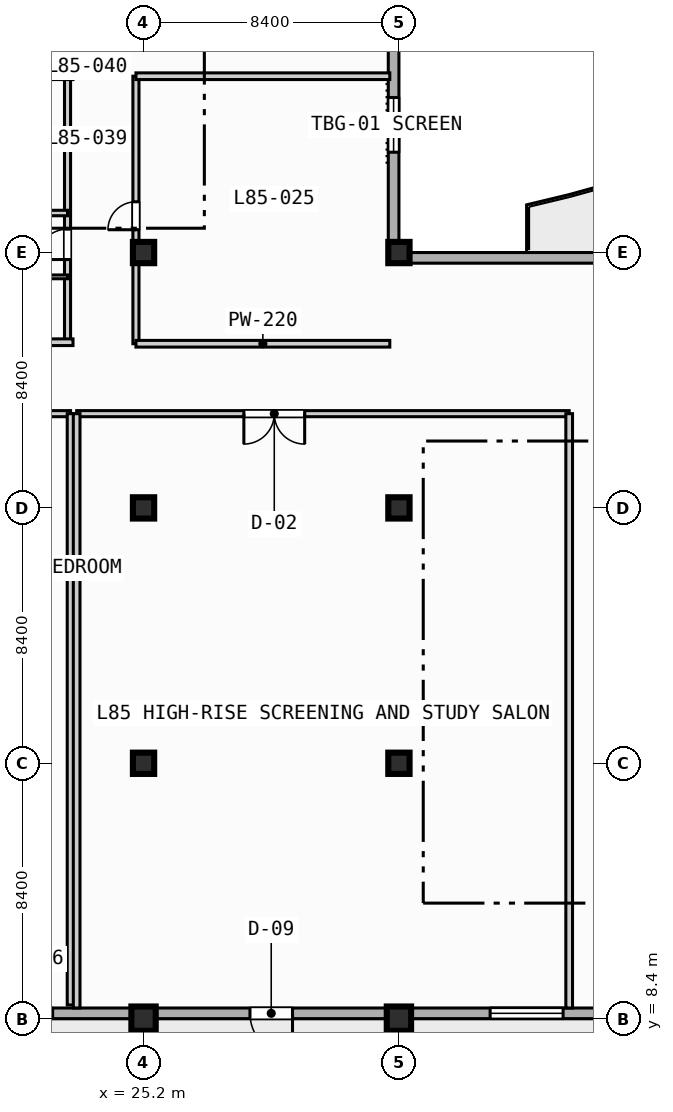
"""IFC4 building model, lengths in metres.
Left out: names, types, materials, properties, quantities, classifications, styles, units other than length and angle.
Written with IfcOpenShell. Run it as: python <this file> out.ifc"""

import sys

from ifc_helpers import new_model, si_unit, direction, frame, frame_2d, origin, origin_2d, place, context, subcontext, project, spatial, rectangle, extrude, element, fill, save


model = new_model("IFC4")
c1 = context("Model", 3, precision=1e-05, world=origin(), true_north=direction((0.0, 1.0)))
c2 = subcontext(c1, "Body", "Model", "MODEL_VIEW")
j1 = project(units=[si_unit("LENGTHUNIT", "METRE"), si_unit("PLANEANGLEUNIT", "RADIAN")], contexts=[c1])
p1 = place(None, origin())
s1 = spatial("IfcSite", under=j1, at=p1, CompositionType="ELEMENT")
p2 = place(p1, origin())
s2 = spatial("IfcBuilding", under=s1, at=p2, CompositionType="ELEMENT")
p3 = place(p2, frame((0.0, 0.0, 343.7)))
s3 = spatial("IfcBuildingStorey", under=s2, at=p3, CompositionType="ELEMENT", Elevation=343.7)
p4 = place(p3, frame((25.2, 8.4, 0.0), z_axis=(0.0, 0.0, 1.0), x_axis=(1.0, 0.0, 0.0)))
e1 = element("IfcColumn", 1, at=p4, inside=s3, PredefinedType="COLUMN", context=c2, shape_type="SweptSolid", body=[
    extrude(rectangle(XDim=0.8, YDim=0.8, at=origin_2d()), origin(), (0.0, 0.0, 1.0), 3.9),
])
for number, where, z_axis, x_axis in (
    (2, (25.2, 16.8, 0.0), (0.0, 0.0, 1.0), (1.0, 0.0, 0.0)),
    (3, (25.2, 25.2, 0.0), (0.0, 0.0, 1.0), (1.0, 0.0, 0.0)),
    (4, (25.2, 33.6, 0.0), (0.0, 0.0, 1.0), (1.0, 0.0, 0.0)),
):
    element("IfcColumn", number, at=place(p3, frame(where, z_axis=z_axis, x_axis=x_axis)), inside=s3, PredefinedType="COLUMN", context=c2, shape_type="SweptSolid", body=[
        extrude(rectangle(XDim=0.7, YDim=0.7, at=origin_2d()), origin(), (0.0, 0.0, 1.0), 3.9),
    ])
p5 = place(p3, frame((33.6, 8.4, 0.0), z_axis=(0.0, 0.0, 1.0), x_axis=(1.0, 0.0, 0.0)))
e5 = element("IfcColumn", 5, at=p5, inside=s3, PredefinedType="COLUMN", context=c2, shape_type="SweptSolid", body=[
    extrude(rectangle(XDim=0.8, YDim=0.8, at=origin_2d()), origin(), (0.0, 0.0, 1.0), 3.9),
])
for number, where, z_axis, x_axis in (
    (6, (33.6, 16.8, 0.0), (0.0, 0.0, 1.0), (1.0, 0.0, 0.0)),
    (7, (33.6, 25.2, 0.0), (0.0, 0.0, 1.0), (1.0, 0.0, 0.0)),
    (8, (33.6, 33.6, 0.0), (0.0, 0.0, 1.0), (1.0, 0.0, 0.0)),
):
    element("IfcColumn", number, at=place(p3, frame(where, z_axis=z_axis, x_axis=x_axis)), inside=s3, PredefinedType="COLUMN", context=c2, shape_type="SweptSolid", body=[
        extrude(rectangle(XDim=0.7, YDim=0.7, at=origin_2d()), origin(), (0.0, 0.0, 1.0), 3.9),
    ])
p6 = place(p3, frame((33.425, 72.425, 0.0), z_axis=(0.0, 0.0, 1.0), x_axis=(0.0, -1.0, 0.0)))
e9 = element("IfcWall", 9, at=p6, inside=s3, PredefinedType="STANDARD", context=c2, shape_type="SweptSolid", body=[
    extrude(rectangle(XDim=39.0, YDim=0.35, at=frame_2d((19.5, 0.0))), origin(), (0.0, 0.0, 1.0), 3.67),
])
p7 = place(p6, frame((33.725, 0.0, 0.85)))
e10 = element("IfcOpeningElement", 10, at=p7, cuts=e9, PredefinedType="OPENING", context=c2, shape_type="SweptSolid", body=[
    extrude(rectangle(XDim=1.8, YDim=1.8, at=frame_2d((0.9, 0.9))), frame((0.0, 0.185, 0.0), z_axis=(0.0, -1.0, 0.0), x_axis=(1.0, 0.0, 0.0)), (0.0, 0.0, 1.0), 0.37),
])
p8 = place(p6, frame((8.225, 0.0, 0.85)))
e11 = element("IfcOpeningElement", 11, at=p8, cuts=e9, PredefinedType="OPENING", context=c2, shape_type="SweptSolid", body=[
    extrude(rectangle(XDim=2.4, YDim=1.95, at=frame_2d((1.2, 0.975))), frame((0.0, 0.185, 0.0), z_axis=(0.0, -1.0, 0.0), x_axis=(1.0, 0.0, 0.0)), (0.0, 0.0, 1.0), 0.37),
])
p9 = place(p3, frame((33.425, 33.425, 0.0), z_axis=(0.0, 0.0, 1.0), x_axis=(1.0, 0.0, 0.0)))
e12 = element("IfcWall", 12, at=p9, inside=s3, PredefinedType="STANDARD", context=c2, shape_type="SweptSolid", body=[
    extrude(rectangle(XDim=30.6, YDim=0.35, at=frame_2d((15.3, 0.0))), origin(), (0.0, 0.0, 1.0), 3.67),
])
p10 = place(p9, frame((12.075, 0.0, 0.0)))
e13 = element("IfcOpeningElement", 13, at=p10, cuts=e12, PredefinedType="OPENING", context=c2, shape_type="SweptSolid", body=[
    extrude(rectangle(XDim=1.4, YDim=2.2, at=frame_2d((0.7, 1.1))), frame((0.0, 0.185, 0.0), z_axis=(0.0, -1.0, 0.0), x_axis=(1.0, 0.0, 0.0)), (0.0, 0.0, 1.0), 0.37),
])
p11 = place(p3, frame((64.025, 8.575, 0.0), z_axis=(0.0, 0.0, 1.0), x_axis=(-1.0, 0.0, 0.0)))
e14 = element("IfcWall", 14, at=p11, inside=s3, PredefinedType="STANDARD", context=c2, shape_type="SweptSolid", body=[
    extrude(rectangle(XDim=52.45, YDim=0.35, at=frame_2d((26.225, 0.0))), origin(), (0.0, 0.0, 1.0), 3.67),
])
p12 = place(p11, frame((33.925, 0.0, 0.0)))
e15 = element("IfcOpeningElement", 15, at=p12, cuts=e14, PredefinedType="OPENING", context=c2, shape_type="SweptSolid", body=[
    extrude(rectangle(XDim=1.4, YDim=2.2, at=frame_2d((0.7, 1.1))), frame((0.0, 0.185, 0.0), z_axis=(0.0, -1.0, 0.0), x_axis=(1.0, 0.0, 0.0)), (0.0, 0.0, 1.0), 0.37),
])
p13 = place(p11, frame((25.025, 0.0, 0.85)))
e16 = element("IfcOpeningElement", 16, at=p13, cuts=e14, PredefinedType="OPENING", context=c2, shape_type="SweptSolid", body=[
    extrude(rectangle(XDim=2.4, YDim=1.95, at=frame_2d((1.2, 0.975))), frame((0.0, 0.185, 0.0), z_axis=(0.0, -1.0, 0.0), x_axis=(1.0, 0.0, 0.0)), (0.0, 0.0, 1.0), 0.37),
])
p14 = place(p11, frame((16.925, 0.0, 0.85)))
e17 = element("IfcOpeningElement", 17, at=p14, cuts=e14, PredefinedType="OPENING", context=c2, shape_type="SweptSolid", body=[
    extrude(rectangle(XDim=1.8, YDim=1.8, at=frame_2d((0.9, 0.9))), frame((0.0, 0.185, 0.0), z_axis=(0.0, -1.0, 0.0), x_axis=(1.0, 0.0, 0.0)), (0.0, 0.0, 1.0), 0.37),
])
p15 = place(p11, frame((41.815, 0.0, 0.85)))
e18 = element("IfcOpeningElement", 18, at=p15, cuts=e14, PredefinedType="OPENING", context=c2, shape_type="SweptSolid", body=[
    extrude(rectangle(XDim=1.8, YDim=1.8, at=frame_2d((0.9, 0.9))), frame((0.0, 0.185, 0.0), z_axis=(0.0, -1.0, 0.0), x_axis=(1.0, 0.0, 0.0)), (0.0, 0.0, 1.0), 0.37),
])
p16 = place(p11, frame((49.535, 0.0, 0.85)))
e19 = element("IfcOpeningElement", 19, at=p16, cuts=e14, PredefinedType="OPENING", context=c2, shape_type="SweptSolid", body=[
    extrude(rectangle(XDim=1.8, YDim=1.8, at=frame_2d((0.9, 0.9))), frame((0.0, 0.185, 0.0), z_axis=(0.0, -1.0, 0.0), x_axis=(1.0, 0.0, 0.0)), (0.0, 0.0, 1.0), 0.37),
])
p17 = place(p3, frame((24.95, 30.6, 0.0), z_axis=(0.0, 0.0, 1.0), x_axis=(0.0, 1.0, 0.0)))
e20 = element("IfcWall", 20, at=p17, inside=s3, PredefinedType="PARTITIONING", context=c2, shape_type="SweptSolid", body=[
    extrude(rectangle(XDim=8.8, YDim=0.2, at=frame_2d((4.4, 0.0))), origin(), (0.0, 0.0, 1.0), 3.07),
])
p18 = place(p17, frame((3.75, 0.0, 0.0)))
e21 = element("IfcOpeningElement", 21, at=p18, cuts=e20, PredefinedType="OPENING", context=c2, shape_type="SweptSolid", body=[
    extrude(rectangle(XDim=0.92, YDim=2.1, at=frame_2d((0.46, 1.05))), frame((0.0, 0.11, 0.0), z_axis=(0.0, -1.0, 0.0), x_axis=(1.0, 0.0, 0.0)), (0.0, 0.0, 1.0), 0.22),
])
for number, where, z_axis, x_axis in (
    (22, (24.95, 30.6, 0.0), (0.0, 0.0, 1.0), (1.0, 0.0, 0.0)),
    (23, (24.95, 39.4, 0.0), (0.0, 0.0, 1.0), (1.0, 0.0, 0.0)),
):
    element("IfcWall", number, at=place(p3, frame(where, z_axis=z_axis, x_axis=x_axis)), inside=s3, PredefinedType="PARTITIONING", context=c2, shape_type="SweptSolid", body=[
        extrude(rectangle(XDim=8.35, YDim=0.22, at=frame_2d((4.175, 0.0))), origin(), (0.0, 0.0, 1.0), 3.67),
    ])
p19 = place(p3, frame((11.8, 28.3, 0.0), z_axis=(0.0, 0.0, 1.0), x_axis=(1.0, 0.0, 0.0)))
e24 = element("IfcWall", 24, at=p19, inside=s3, PredefinedType="PARTITIONING", context=c2, shape_type="SweptSolid", body=[
    extrude(rectangle(XDim=11.0, YDim=0.2, at=frame_2d((5.5, 0.0))), origin(), (0.0, 0.0, 1.0), 3.67),
])
p20 = place(p19, frame((4.05, 0.0, 0.0)))
e25 = element("IfcOpeningElement", 25, at=p20, cuts=e24, PredefinedType="OPENING", context=c2, shape_type="SweptSolid", body=[
    extrude(rectangle(XDim=1.0, YDim=2.15, at=frame_2d((0.5, 1.075))), frame((0.0, 0.11, 0.0), z_axis=(0.0, -1.0, 0.0), x_axis=(1.0, 0.0, 0.0)), (0.0, 0.0, 1.0), 0.22),
])
p21 = place(p3, frame((22.8, 8.85, 0.0), z_axis=(0.0, 0.0, 1.0), x_axis=(0.0, 1.0, 0.0)))
e26 = element("IfcWall", 26, at=p21, inside=s3, PredefinedType="PARTITIONING", context=c2, shape_type="SweptSolid", body=[
    extrude(rectangle(XDim=19.45, YDim=0.22, at=frame_2d((9.725, 0.0))), origin(), (0.0, 0.0, 1.0), 3.67),
])
p22 = place(p3, frame((23.0, 28.3, 0.0), z_axis=(0.0, 0.0, 1.0), x_axis=(1.0, 0.0, 0.0)))
e27 = element("IfcWall", 27, at=p22, inside=s3, PredefinedType="PARTITIONING", context=c2, shape_type="SweptSolid", body=[
    extrude(rectangle(XDim=16.2, YDim=0.2, at=frame_2d((8.1, 0.0))), origin(), (0.0, 0.0, 1.0), 3.67),
])
p23 = place(p22, frame((5.5, 0.0, 0.0)))
e28 = element("IfcOpeningElement", 28, at=p23, cuts=e27, PredefinedType="OPENING", context=c2, shape_type="SweptSolid", body=[
    extrude(rectangle(XDim=2.0, YDim=2.15, at=frame_2d((1.0, 1.075))), frame((0.0, 0.11, 0.0), z_axis=(0.0, -1.0, 0.0), x_axis=(1.0, 0.0, 0.0)), (0.0, 0.0, 1.0), 0.22),
])
for number, where, z_axis, x_axis in (
    (29, (23.0, 8.75, 0.0), (0.0, 0.0, 1.0), (0.0, 1.0, 0.0)),
    (30, (39.2, 8.75, 0.0), (0.0, 0.0, 1.0), (0.0, 1.0, 0.0)),
):
    element("IfcWall", number, at=place(p3, frame(where, z_axis=z_axis, x_axis=x_axis)), inside=s3, PredefinedType="PARTITIONING", context=c2, shape_type="SweptSolid", body=[
        extrude(rectangle(XDim=19.55, YDim=0.22, at=frame_2d((9.775, 0.0))), origin(), (0.0, 0.0, 1.0), 3.67),
    ])
p24 = place(p3, frame((22.7, 30.65, 0.0), z_axis=(0.0, 0.0, 1.0), x_axis=(0.0, 1.0, 0.0)))
e31 = element("IfcWall", 31, at=p24, inside=s3, PredefinedType="PARTITIONING", context=c2, shape_type="SweptSolid", body=[
    extrude(rectangle(XDim=8.75, YDim=0.2, at=frame_2d((4.375, 0.0))), origin(), (0.0, 0.0, 1.0), 3.67),
])
p25 = place(p24, frame((2.72, 0.0, 0.0)))
e32 = element("IfcOpeningElement", 32, at=p25, cuts=e31, PredefinedType="OPENING", context=c2, shape_type="SweptSolid", body=[
    extrude(rectangle(XDim=1.0, YDim=2.15, at=frame_2d((0.5, 1.075))), frame((0.0, 0.11, 0.0), z_axis=(0.0, -1.0, 0.0), x_axis=(1.0, 0.0, 0.0)), (0.0, 0.0, 1.0), 0.22),
])
for number, where, z_axis, x_axis in (
    (33, (8.6, 30.65, 0.0), (0.0, 0.0, 1.0), (1.0, 0.0, 0.0)),
    (34, (8.6, 39.4, 0.0), (0.0, 0.0, 1.0), (1.0, 0.0, 0.0)),
):
    element("IfcWall", number, at=place(p3, frame(where, z_axis=z_axis, x_axis=x_axis)), inside=s3, PredefinedType="PARTITIONING", context=c2, shape_type="SweptSolid", body=[
        extrude(rectangle(XDim=14.28, YDim=0.22, at=frame_2d((7.14, 0.0))), origin(), (0.0, 0.0, 1.0), 3.67),
    ])
for number, where, z_axis, x_axis in (
    (35, (20.25, 34.9, 0.0), (0.0, 0.0, 1.0), (1.0, 0.0, 0.0)),
    (36, (20.25, 37.06, 0.0), (0.0, 0.0, 1.0), (1.0, 0.0, 0.0)),
):
    element("IfcWall", number, at=place(p3, frame(where, z_axis=z_axis, x_axis=x_axis)), inside=s3, PredefinedType="PLUMBINGWALL", context=c2, shape_type="SweptSolid", body=[
        extrude(rectangle(XDim=2.45, YDim=0.18, at=frame_2d((1.225, 0.0))), origin(), (0.0, 0.0, 1.0), 3.67),
    ])
p26 = place(p3, frame((8.75, 32.8, 0.0), z_axis=(0.0, 0.0, 1.0), x_axis=(1.0, 0.0, 0.0)))
e37 = element("IfcWall", 37, at=p26, inside=s3, PredefinedType="PARTITIONING", context=c2, shape_type="SweptSolid", body=[
    extrude(rectangle(XDim=13.95, YDim=0.125, at=frame_2d((6.975, 0.0))), origin(), (0.0, 0.0, 1.0), 3.67),
])
p27 = place(p26, frame((5.29, 0.0, 0.0)))
e38 = element("IfcOpeningElement", 38, at=p27, cuts=e37, PredefinedType="OPENING", context=c2, shape_type="SweptSolid", body=[
    extrude(rectangle(XDim=0.92, YDim=2.1, at=frame_2d((0.46, 1.05))), frame((0.0, 0.073, 0.0), z_axis=(0.0, -1.0, 0.0), x_axis=(1.0, 0.0, 0.0)), (0.0, 0.0, 1.0), 0.145),
])
p28 = place(p7, origin())
e39 = element("IfcWindow", 39, at=p28, inside=s3, PartitioningType="SINGLE_PANEL", PredefinedType="WINDOW", context=c2, shape_type="SweptSolid", body=[
    extrude(rectangle(XDim=1.8, YDim=1.8, at=frame_2d((0.9, 0.9))), frame((0.0, 0.03, 0.0), z_axis=(0.0, -1.0, 0.0), x_axis=(1.0, 0.0, 0.0)), (0.0, 0.0, 1.0), 0.06),
])
fill(e10, e39)
p29 = place(p12, origin())
e40 = element("IfcDoor", 40, at=p29, inside=s3, OperationType="SINGLE_SWING_LEFT", PredefinedType="DOOR", context=c2, shape_type="SweptSolid", body=[
    extrude(rectangle(XDim=1.4, YDim=2.2, at=frame_2d((0.7, 1.1))), frame((0.0, 0.025, 0.0), z_axis=(0.0, -1.0, 0.0), x_axis=(1.0, 0.0, 0.0)), (0.0, 0.0, 1.0), 0.05),
])
fill(e15, e40)
p30 = place(p13, origin())
e41 = element("IfcWindow", 41, at=p30, inside=s3, PartitioningType="SINGLE_PANEL", PredefinedType="WINDOW", context=c2, shape_type="SweptSolid", body=[
    extrude(rectangle(XDim=2.4, YDim=1.95, at=frame_2d((1.2, 0.975))), frame((0.0, 0.03, 0.0), z_axis=(0.0, -1.0, 0.0), x_axis=(1.0, 0.0, 0.0)), (0.0, 0.0, 1.0), 0.06),
])
fill(e16, e41)
p31 = place(p15, origin())
e42 = element("IfcWindow", 42, at=p31, inside=s3, PartitioningType="SINGLE_PANEL", PredefinedType="WINDOW", context=c2, shape_type="SweptSolid", body=[
    extrude(rectangle(XDim=1.8, YDim=1.8, at=frame_2d((0.9, 0.9))), frame((0.0, 0.03, 0.0), z_axis=(0.0, -1.0, 0.0), x_axis=(1.0, 0.0, 0.0)), (0.0, 0.0, 1.0), 0.06),
])
fill(e18, e42)
p32 = place(p18, origin())
e43 = element("IfcDoor", 43, at=p32, inside=s3, OperationType="SINGLE_SWING_LEFT", PredefinedType="DOOR", context=c2, shape_type="SweptSolid", body=[
    extrude(rectangle(XDim=0.92, YDim=2.1, at=frame_2d((0.46, 1.05))), frame((0.0, 0.025, 0.0), z_axis=(0.0, -1.0, 0.0), x_axis=(1.0, 0.0, 0.0)), (0.0, 0.0, 1.0), 0.05),
])
fill(e21, e43)
p33 = place(p23, origin())
e44 = element("IfcDoor", 44, at=p33, inside=s3, OperationType="SINGLE_SWING_RIGHT", PredefinedType="DOOR", context=c2, shape_type="SweptSolid", body=[
    extrude(rectangle(XDim=2.0, YDim=2.15, at=frame_2d((1.0, 1.075))), frame((0.0, 0.025, 0.0), z_axis=(0.0, -1.0, 0.0), x_axis=(1.0, 0.0, 0.0)), (0.0, 0.0, 1.0), 0.05),
])
fill(e28, e44)
p34 = place(p25, origin())
e45 = element("IfcDoor", 45, at=p34, inside=s3, OperationType="SINGLE_SWING_LEFT", PredefinedType="DOOR", context=c2, shape_type="SweptSolid", body=[
    extrude(rectangle(XDim=1.0, YDim=2.15, at=frame_2d((0.5, 1.075))), frame((0.0, 0.025, 0.0), z_axis=(0.0, -1.0, 0.0), x_axis=(1.0, 0.0, 0.0)), (0.0, 0.0, 1.0), 0.05),
])
fill(e32, e45)
save(model, sys.argv[1])
